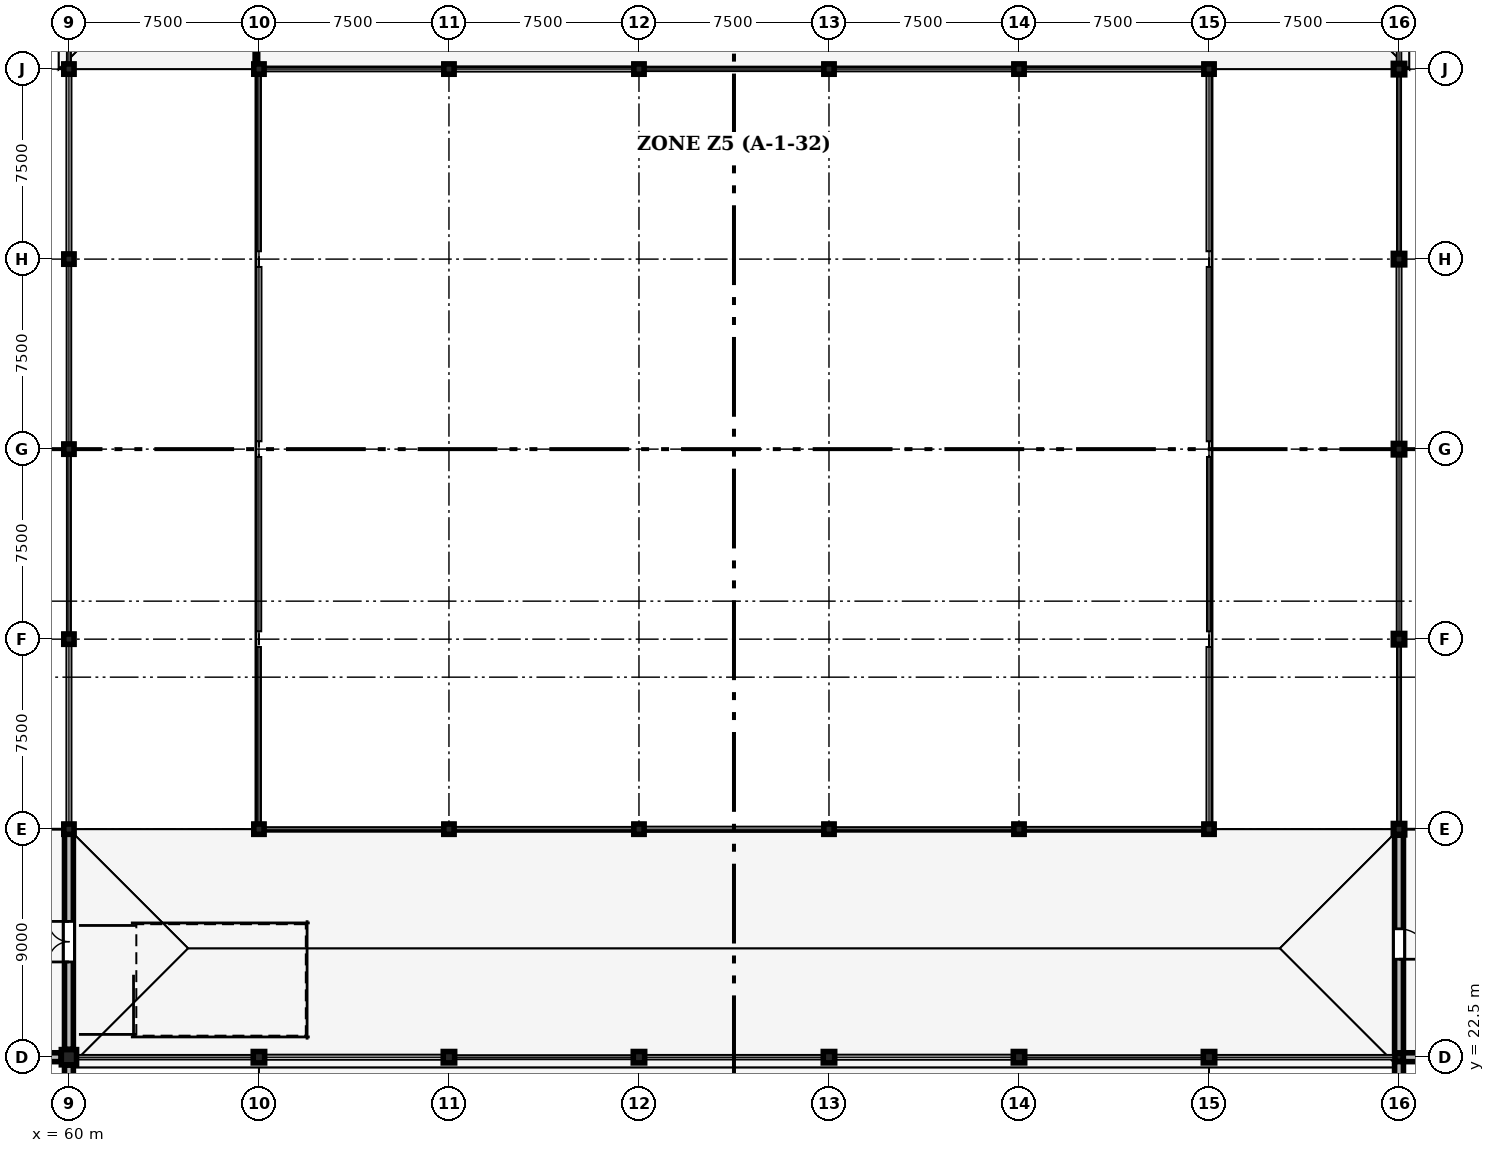
"""IFC4 building model, lengths in metres.
Left out: names, types, materials, properties, quantities, classifications, styles, units other than length and angle.
Written with IfcOpenShell. Run it as: python <this file> out.ifc"""

import sys

from ifc_helpers import new_model, si_unit, direction, frame, frame_2d, origin, origin_2d, place, context, subcontext, project, spatial, rectangle, hollow_circle, i_section, extrude, element, fill, save


model = new_model("IFC4")
c1 = context("Model", 3, precision=1e-05, world=origin(), true_north=direction((0.0, 1.0)))
c2 = subcontext(c1, "Body", "Model", "MODEL_VIEW")
j1 = project(units=[si_unit("LENGTHUNIT", "METRE"), si_unit("PLANEANGLEUNIT", "RADIAN")], contexts=[c1])
p1 = place(None, origin())
s1 = spatial("IfcSite", under=j1, at=p1, CompositionType="ELEMENT")
p2 = place(p1, origin())
s2 = spatial("IfcBuilding", under=s1, at=p2, CompositionType="ELEMENT")
p3 = place(p2, frame((0.0, 0.0, 9.3)))
s3 = spatial("IfcBuildingStorey", under=s2, at=p3, CompositionType="ELEMENT", Elevation=9.3)
p4 = place(p3, frame((60.0, 22.5, 0.0), z_axis=(0.0, 0.0, 1.0), x_axis=(1.0, 0.0, 0.0)))
e1 = element("IfcColumn", 1, at=p4, inside=s3, PredefinedType="COLUMN", context=c2, shape_type="SweptSolid", body=[
    extrude(rectangle(XDim=0.6, YDim=0.6, at=origin_2d()), origin(), (0.0, 0.0, 1.0), 4.8),
])
for number, where, z_axis, x_axis in (
    (2, (60.0, 31.5, 0.0), (0.0, 0.0, 1.0), (1.0, 0.0, 0.0)),
    (3, (60.0, 39.0, 0.0), (0.0, 0.0, 1.0), (1.0, 0.0, 0.0)),
    (4, (60.0, 46.5, 0.0), (0.0, 0.0, 1.0), (1.0, 0.0, 0.0)),
    (5, (60.0, 54.0, 0.0), (0.0, 0.0, 1.0), (1.0, 0.0, 0.0)),
    (6, (60.0, 61.5, 0.0), (0.0, 0.0, 1.0), (1.0, 0.0, 0.0)),
):
    element("IfcColumn", number, at=place(p3, frame(where, z_axis=z_axis, x_axis=x_axis)), inside=s3, PredefinedType="COLUMN", context=c2, shape_type="SweptSolid", body=[
        extrude(i_section(OverallWidth=0.3, OverallDepth=0.36, WebThickness=0.012, FlangeThickness=0.022, FilletRadius=0.027, at=origin_2d()), origin(), (0.0, 0.0, 1.0), 4.8),
    ])
p5 = place(p3, frame((67.5, 22.5, 0.0), z_axis=(0.0, 0.0, 1.0), x_axis=(1.0, 0.0, 0.0)))
e7 = element("IfcColumn", 7, at=p5, inside=s3, PredefinedType="COLUMN", context=c2, shape_type="SweptSolid", body=[
    extrude(rectangle(XDim=0.45, YDim=0.45, at=origin_2d()), origin(), (0.0, 0.0, 1.0), 4.8),
])
for number, where, z_axis, x_axis in (
    (8, (67.5, 31.5, 0.0), (0.0, 0.0, 1.0), (1.0, 0.0, 0.0)),
    (9, (67.5, 61.5, 0.0), (0.0, 0.0, 1.0), (1.0, 0.0, 0.0)),
):
    element("IfcColumn", number, at=place(p3, frame(where, z_axis=z_axis, x_axis=x_axis)), inside=s3, PredefinedType="COLUMN", context=c2, shape_type="SweptSolid", body=[
        extrude(i_section(OverallWidth=0.3, OverallDepth=0.36, WebThickness=0.012, FlangeThickness=0.022, FilletRadius=0.027, at=origin_2d()), origin(), (0.0, 0.0, 1.0), 4.8),
    ])
p6 = place(p3, frame((75.0, 22.5, 0.0), z_axis=(0.0, 0.0, 1.0), x_axis=(1.0, 0.0, 0.0)))
e10 = element("IfcColumn", 10, at=p6, inside=s3, PredefinedType="COLUMN", context=c2, shape_type="SweptSolid", body=[
    extrude(rectangle(XDim=0.45, YDim=0.45, at=origin_2d()), origin(), (0.0, 0.0, 1.0), 4.8),
])
for number, where, z_axis, x_axis in (
    (11, (75.0, 31.5, 0.0), (0.0, 0.0, 1.0), (1.0, 0.0, 0.0)),
    (12, (75.0, 61.5, 0.0), (0.0, 0.0, 1.0), (1.0, 0.0, 0.0)),
):
    element("IfcColumn", number, at=place(p3, frame(where, z_axis=z_axis, x_axis=x_axis)), inside=s3, PredefinedType="COLUMN", context=c2, shape_type="SweptSolid", body=[
        extrude(i_section(OverallWidth=0.3, OverallDepth=0.36, WebThickness=0.012, FlangeThickness=0.022, FilletRadius=0.027, at=origin_2d()), origin(), (0.0, 0.0, 1.0), 4.8),
    ])
p7 = place(p3, frame((82.5, 22.5, 0.0), z_axis=(0.0, 0.0, 1.0), x_axis=(1.0, 0.0, 0.0)))
e13 = element("IfcColumn", 13, at=p7, inside=s3, PredefinedType="COLUMN", context=c2, shape_type="SweptSolid", body=[
    extrude(rectangle(XDim=0.45, YDim=0.45, at=origin_2d()), origin(), (0.0, 0.0, 1.0), 4.8),
])
for number, where, z_axis, x_axis in (
    (14, (82.5, 31.5, 0.0), (0.0, 0.0, 1.0), (1.0, 0.0, 0.0)),
    (15, (82.5, 61.5, 0.0), (0.0, 0.0, 1.0), (1.0, 0.0, 0.0)),
):
    element("IfcColumn", number, at=place(p3, frame(where, z_axis=z_axis, x_axis=x_axis)), inside=s3, PredefinedType="COLUMN", context=c2, shape_type="SweptSolid", body=[
        extrude(i_section(OverallWidth=0.3, OverallDepth=0.36, WebThickness=0.012, FlangeThickness=0.022, FilletRadius=0.027, at=origin_2d()), origin(), (0.0, 0.0, 1.0), 4.8),
    ])
p8 = place(p3, frame((90.0, 22.5, 0.0), z_axis=(0.0, 0.0, 1.0), x_axis=(1.0, 0.0, 0.0)))
e16 = element("IfcColumn", 16, at=p8, inside=s3, PredefinedType="COLUMN", context=c2, shape_type="SweptSolid", body=[
    extrude(rectangle(XDim=0.45, YDim=0.45, at=origin_2d()), origin(), (0.0, 0.0, 1.0), 4.8),
])
for number, where, z_axis, x_axis in (
    (17, (90.0, 31.5, 0.0), (0.0, 0.0, 1.0), (1.0, 0.0, 0.0)),
    (18, (90.0, 61.5, 0.0), (0.0, 0.0, 1.0), (1.0, 0.0, 0.0)),
):
    element("IfcColumn", number, at=place(p3, frame(where, z_axis=z_axis, x_axis=x_axis)), inside=s3, PredefinedType="COLUMN", context=c2, shape_type="SweptSolid", body=[
        extrude(i_section(OverallWidth=0.3, OverallDepth=0.36, WebThickness=0.012, FlangeThickness=0.022, FilletRadius=0.027, at=origin_2d()), origin(), (0.0, 0.0, 1.0), 4.8),
    ])
p9 = place(p3, frame((97.5, 22.5, 0.0), z_axis=(0.0, 0.0, 1.0), x_axis=(1.0, 0.0, 0.0)))
e19 = element("IfcColumn", 19, at=p9, inside=s3, PredefinedType="COLUMN", context=c2, shape_type="SweptSolid", body=[
    extrude(rectangle(XDim=0.45, YDim=0.45, at=origin_2d()), origin(), (0.0, 0.0, 1.0), 4.8),
])
for number, where, z_axis, x_axis in (
    (20, (97.5, 31.5, 0.0), (0.0, 0.0, 1.0), (1.0, 0.0, 0.0)),
    (21, (97.5, 61.5, 0.0), (0.0, 0.0, 1.0), (1.0, 0.0, 0.0)),
):
    element("IfcColumn", number, at=place(p3, frame(where, z_axis=z_axis, x_axis=x_axis)), inside=s3, PredefinedType="COLUMN", context=c2, shape_type="SweptSolid", body=[
        extrude(i_section(OverallWidth=0.3, OverallDepth=0.36, WebThickness=0.012, FlangeThickness=0.022, FilletRadius=0.027, at=origin_2d()), origin(), (0.0, 0.0, 1.0), 4.8),
    ])
p10 = place(p3, frame((105.0, 22.5, 0.0), z_axis=(0.0, 0.0, 1.0), x_axis=(1.0, 0.0, 0.0)))
e22 = element("IfcColumn", 22, at=p10, inside=s3, PredefinedType="COLUMN", context=c2, shape_type="SweptSolid", body=[
    extrude(rectangle(XDim=0.45, YDim=0.45, at=origin_2d()), origin(), (0.0, 0.0, 1.0), 4.8),
])
for number, where, z_axis, x_axis in (
    (23, (105.0, 31.5, 0.0), (0.0, 0.0, 1.0), (1.0, 0.0, 0.0)),
    (24, (105.0, 61.5, 0.0), (0.0, 0.0, 1.0), (1.0, 0.0, 0.0)),
):
    element("IfcColumn", number, at=place(p3, frame(where, z_axis=z_axis, x_axis=x_axis)), inside=s3, PredefinedType="COLUMN", context=c2, shape_type="SweptSolid", body=[
        extrude(i_section(OverallWidth=0.3, OverallDepth=0.36, WebThickness=0.012, FlangeThickness=0.022, FilletRadius=0.027, at=origin_2d()), origin(), (0.0, 0.0, 1.0), 4.8),
    ])
p11 = place(p3, frame((112.5, 22.5, 0.0), z_axis=(0.0, 0.0, 1.0), x_axis=(1.0, 0.0, 0.0)))
e25 = element("IfcColumn", 25, at=p11, inside=s3, PredefinedType="COLUMN", context=c2, shape_type="SweptSolid", body=[
    extrude(rectangle(XDim=0.32, YDim=0.32, at=origin_2d()), origin(), (0.0, 0.0, 1.0), 4.8),
])
for number, where, z_axis, x_axis in (
    (26, (112.5, 31.5, 0.0), (0.0, 0.0, 1.0), (1.0, 0.0, 0.0)),
    (27, (112.5, 39.0, 0.0), (0.0, 0.0, 1.0), (1.0, 0.0, 0.0)),
    (28, (112.5, 46.5, 0.0), (0.0, 0.0, 1.0), (1.0, 0.0, 0.0)),
    (29, (112.5, 54.0, 0.0), (0.0, 0.0, 1.0), (1.0, 0.0, 0.0)),
    (30, (112.5, 61.5, 0.0), (0.0, 0.0, 1.0), (1.0, 0.0, 0.0)),
):
    element("IfcColumn", number, at=place(p3, frame(where, z_axis=z_axis, x_axis=x_axis)), inside=s3, PredefinedType="COLUMN", context=c2, shape_type="SweptSolid", body=[
        extrude(rectangle(XDim=0.45, YDim=0.45, at=origin_2d()), origin(), (0.0, 0.0, 1.0), 4.8),
    ])
p12 = place(p3, frame((60.0, 31.5, 4.8), z_axis=(0.0, 0.0, 1.0), x_axis=(1.0, 0.0, 0.0)))
e31 = element("IfcColumn", 31, at=p12, inside=s3, PredefinedType="COLUMN", context=c2, shape_type="SweptSolid", body=[
    extrude(hollow_circle(Radius=0.203, WallThickness=0.016, at=origin_2d()), origin(), (0.0, 0.0, 1.0), 2.75),
])
p13 = place(p3, frame((60.0, 39.0, 4.8), z_axis=(0.0, 0.0, 1.0), x_axis=(1.0, 0.0, 0.0)))
e32 = element("IfcColumn", 32, at=p13, inside=s3, PredefinedType="COLUMN", context=c2, shape_type="SweptSolid", body=[
    extrude(hollow_circle(Radius=0.203, WallThickness=0.016, at=origin_2d()), origin(), (0.0, 0.0, 1.0), 4.4),
])
p14 = place(p3, frame((60.0, 46.5, 4.8), z_axis=(0.0, 0.0, 1.0), x_axis=(1.0, 0.0, 0.0)))
e33 = element("IfcColumn", 33, at=p14, inside=s3, PredefinedType="COLUMN", context=c2, shape_type="SweptSolid", body=[
    extrude(hollow_circle(Radius=0.203, WallThickness=0.016, at=origin_2d()), origin(), (0.0, 0.0, 1.0), 4.95),
])
p15 = place(p3, frame((60.0, 54.0, 4.8), z_axis=(0.0, 0.0, 1.0), x_axis=(1.0, 0.0, 0.0)))
e34 = element("IfcColumn", 34, at=p15, inside=s3, PredefinedType="COLUMN", context=c2, shape_type="SweptSolid", body=[
    extrude(hollow_circle(Radius=0.203, WallThickness=0.016, at=origin_2d()), origin(), (0.0, 0.0, 1.0), 4.4),
])
p16 = place(p3, frame((60.0, 61.5, 4.8), z_axis=(0.0, 0.0, 1.0), x_axis=(1.0, 0.0, 0.0)))
e35 = element("IfcColumn", 35, at=p16, inside=s3, PredefinedType="COLUMN", context=c2, shape_type="SweptSolid", body=[
    extrude(hollow_circle(Radius=0.203, WallThickness=0.016, at=origin_2d()), origin(), (0.0, 0.0, 1.0), 2.75),
])
for number, where, z_axis, x_axis in (
    (36, (67.5, 31.5, 4.8), (0.0, 0.0, 1.0), (1.0, 0.0, 0.0)),
    (37, (67.5, 61.5, 4.8), (0.0, 0.0, 1.0), (1.0, 0.0, 0.0)),
):
    element("IfcColumn", number, at=place(p3, frame(where, z_axis=z_axis, x_axis=x_axis)), inside=s3, PredefinedType="COLUMN", context=c2, shape_type="SweptSolid", body=[
        extrude(hollow_circle(Radius=0.203, WallThickness=0.016, at=origin_2d()), origin(), (0.0, 0.0, 1.0), 4.415),
    ])
for number, where, z_axis, x_axis in (
    (38, (75.0, 31.5, 4.8), (0.0, 0.0, 1.0), (1.0, 0.0, 0.0)),
    (39, (75.0, 61.5, 4.8), (0.0, 0.0, 1.0), (1.0, 0.0, 0.0)),
):
    element("IfcColumn", number, at=place(p3, frame(where, z_axis=z_axis, x_axis=x_axis)), inside=s3, PredefinedType="COLUMN", context=c2, shape_type="SweptSolid", body=[
        extrude(hollow_circle(Radius=0.203, WallThickness=0.016, at=origin_2d()), origin(), (0.0, 0.0, 1.0), 5.525),
    ])
for number, where, z_axis, x_axis in (
    (40, (82.5, 31.5, 4.8), (0.0, 0.0, 1.0), (1.0, 0.0, 0.0)),
    (41, (82.5, 61.5, 4.8), (0.0, 0.0, 1.0), (1.0, 0.0, 0.0)),
    (42, (90.0, 31.5, 4.8), (0.0, 0.0, 1.0), (1.0, 0.0, 0.0)),
    (43, (90.0, 61.5, 4.8), (0.0, 0.0, 1.0), (1.0, 0.0, 0.0)),
):
    element("IfcColumn", number, at=place(p3, frame(where, z_axis=z_axis, x_axis=x_axis)), inside=s3, PredefinedType="COLUMN", context=c2, shape_type="SweptSolid", body=[
        extrude(hollow_circle(Radius=0.203, WallThickness=0.016, at=origin_2d()), origin(), (0.0, 0.0, 1.0), 6.081),
    ])
for number, where, z_axis, x_axis in (
    (44, (97.5, 31.5, 4.8), (0.0, 0.0, 1.0), (1.0, 0.0, 0.0)),
    (45, (97.5, 61.5, 4.8), (0.0, 0.0, 1.0), (1.0, 0.0, 0.0)),
):
    element("IfcColumn", number, at=place(p3, frame(where, z_axis=z_axis, x_axis=x_axis)), inside=s3, PredefinedType="COLUMN", context=c2, shape_type="SweptSolid", body=[
        extrude(hollow_circle(Radius=0.203, WallThickness=0.016, at=origin_2d()), origin(), (0.0, 0.0, 1.0), 5.525),
    ])
for number, where, z_axis, x_axis in (
    (46, (105.0, 31.5, 4.8), (0.0, 0.0, 1.0), (1.0, 0.0, 0.0)),
    (47, (105.0, 61.5, 4.8), (0.0, 0.0, 1.0), (1.0, 0.0, 0.0)),
):
    element("IfcColumn", number, at=place(p3, frame(where, z_axis=z_axis, x_axis=x_axis)), inside=s3, PredefinedType="COLUMN", context=c2, shape_type="SweptSolid", body=[
        extrude(hollow_circle(Radius=0.203, WallThickness=0.016, at=origin_2d()), origin(), (0.0, 0.0, 1.0), 4.415),
    ])
p17 = place(p3, frame((112.5, 31.5, 4.8), z_axis=(0.0, 0.0, 1.0), x_axis=(1.0, 0.0, 0.0)))
e48 = element("IfcColumn", 48, at=p17, inside=s3, PredefinedType="COLUMN", context=c2, shape_type="SweptSolid", body=[
    extrude(hollow_circle(Radius=0.203, WallThickness=0.016, at=origin_2d()), origin(), (0.0, 0.0, 1.0), 2.75),
])
p18 = place(p3, frame((112.5, 39.0, 4.8), z_axis=(0.0, 0.0, 1.0), x_axis=(1.0, 0.0, 0.0)))
e49 = element("IfcColumn", 49, at=p18, inside=s3, PredefinedType="COLUMN", context=c2, shape_type="SweptSolid", body=[
    extrude(hollow_circle(Radius=0.203, WallThickness=0.016, at=origin_2d()), origin(), (0.0, 0.0, 1.0), 4.4),
])
p19 = place(p3, frame((112.5, 46.5, 4.8), z_axis=(0.0, 0.0, 1.0), x_axis=(1.0, 0.0, 0.0)))
e50 = element("IfcColumn", 50, at=p19, inside=s3, PredefinedType="COLUMN", context=c2, shape_type="SweptSolid", body=[
    extrude(hollow_circle(Radius=0.203, WallThickness=0.016, at=origin_2d()), origin(), (0.0, 0.0, 1.0), 4.95),
])
p20 = place(p3, frame((112.5, 54.0, 4.8), z_axis=(0.0, 0.0, 1.0), x_axis=(1.0, 0.0, 0.0)))
e51 = element("IfcColumn", 51, at=p20, inside=s3, PredefinedType="COLUMN", context=c2, shape_type="SweptSolid", body=[
    extrude(hollow_circle(Radius=0.203, WallThickness=0.016, at=origin_2d()), origin(), (0.0, 0.0, 1.0), 4.4),
])
p21 = place(p3, frame((112.5, 61.5, 4.8), z_axis=(0.0, 0.0, 1.0), x_axis=(1.0, 0.0, 0.0)))
e52 = element("IfcColumn", 52, at=p21, inside=s3, PredefinedType="COLUMN", context=c2, shape_type="SweptSolid", body=[
    extrude(hollow_circle(Radius=0.203, WallThickness=0.016, at=origin_2d()), origin(), (0.0, 0.0, 1.0), 2.75),
])
p22 = place(p3, frame((52.67, 22.5, 0.0), z_axis=(0.0, 0.0, 1.0), x_axis=(1.0, 0.0, 0.0)))
e53 = element("IfcWall", 53, at=p22, inside=s3, PredefinedType="STANDARD", context=c2, shape_type="SweptSolid", body=[
    extrude(rectangle(XDim=7.02, YDim=0.35, at=frame_2d((3.51, 0.0))), origin(), (0.0, 0.0, 1.0), 3.95),
])
p23 = place(p22, frame((2.91, 0.0, 0.0)))
e54 = element("IfcOpeningElement", 54, at=p23, cuts=e53, PredefinedType="OPENING", context=c2, shape_type="SweptSolid", body=[
    extrude(rectangle(XDim=1.2, YDim=2.3, at=frame_2d((0.6, 1.15))), frame((0.0, 0.185, 0.0), z_axis=(0.0, -1.0, 0.0), x_axis=(1.0, 0.0, 0.0)), (0.0, 0.0, 1.0), 0.37),
])
p24 = place(p3, frame((60.0, 22.19, 0.0), z_axis=(0.0, 0.0, 1.0), x_axis=(0.0, -1.0, 0.0)))
e55 = element("IfcWall", 55, at=p24, inside=s3, PredefinedType="STANDARD", context=c2, shape_type="SweptSolid", body=[
    extrude(rectangle(XDim=6.88, YDim=0.35, at=frame_2d((3.44, 0.0))), origin(), (0.0, 0.0, 1.0), 3.95),
])
p25 = place(p24, frame((2.54, 0.0, 0.9)))
e56 = element("IfcOpeningElement", 56, at=p25, cuts=e55, PredefinedType="OPENING", context=c2, shape_type="SweptSolid", body=[
    extrude(rectangle(XDim=1.8, YDim=2.4, at=frame_2d((0.9, 1.2))), frame((0.0, 0.185, 0.0), z_axis=(0.0, -1.0, 0.0), x_axis=(1.0, 0.0, 0.0)), (0.0, 0.0, 1.0), 0.37),
])
p26 = place(p3, frame((60.0, 22.81, 0.0), z_axis=(0.0, 0.0, 1.0), x_axis=(0.0, 1.0, 0.0)))
e57 = element("IfcWall", 57, at=p26, inside=s3, PredefinedType="STANDARD", context=c2, shape_type="SweptSolid", body=[
    extrude(rectangle(XDim=8.5, YDim=0.35, at=frame_2d((4.25, 0.0))), origin(), (0.0, 0.0, 1.0), 4.55),
])
p27 = place(p26, frame((3.45, 0.0, 0.0)))
e58 = element("IfcOpeningElement", 58, at=p27, cuts=e57, PredefinedType="OPENING", context=c2, shape_type="SweptSolid", body=[
    extrude(rectangle(XDim=1.6, YDim=2.35, at=frame_2d((0.8, 1.175))), frame((0.0, 0.185, 0.0), z_axis=(0.0, -1.0, 0.0), x_axis=(1.0, 0.0, 0.0)), (0.0, 0.0, 1.0), 0.37),
])
p28 = place(p3, frame((112.5, 31.265, 0.0), z_axis=(0.0, 0.0, 1.0), x_axis=(0.0, -1.0, 0.0)))
e59 = element("IfcWall", 59, at=p28, inside=s3, PredefinedType="STANDARD", context=c2, shape_type="SweptSolid", body=[
    extrude(rectangle(XDim=8.595, YDim=0.35, at=frame_2d((4.297, 0.0))), origin(), (0.0, 0.0, 1.0), 4.55),
])
p29 = place(p28, frame((3.698, 0.0, 0.0)))
e60 = element("IfcOpeningElement", 60, at=p29, cuts=e59, PredefinedType="OPENING", context=c2, shape_type="SweptSolid", body=[
    extrude(rectangle(XDim=1.2, YDim=2.3, at=frame_2d((0.6, 1.15))), frame((0.0, 0.185, 0.0), z_axis=(0.0, -1.0, 0.0), x_axis=(1.0, 0.0, 0.0)), (0.0, 0.0, 1.0), 0.37),
])
p30 = place(p3, frame((112.67, 22.5, 0.0), z_axis=(0.0, 0.0, 1.0), x_axis=(1.0, 0.0, 0.0)))
e61 = element("IfcWall", 61, at=p30, inside=s3, PredefinedType="STANDARD", context=c2, shape_type="SweptSolid", body=[
    extrude(rectangle(XDim=7.16, YDim=0.35, at=frame_2d((3.58, 0.0))), origin(), (0.0, 0.0, 1.0), 3.95),
])
p31 = place(p30, frame((2.98, 0.0, 0.0)))
e62 = element("IfcOpeningElement", 62, at=p31, cuts=e61, PredefinedType="OPENING", context=c2, shape_type="SweptSolid", body=[
    extrude(rectangle(XDim=1.2, YDim=2.3, at=frame_2d((0.6, 1.15))), frame((0.0, 0.185, 0.0), z_axis=(0.0, -1.0, 0.0), x_axis=(1.0, 0.0, 0.0)), (0.0, 0.0, 1.0), 0.37),
])
p32 = place(p3, frame((112.5, 15.31, 0.0), z_axis=(0.0, 0.0, 1.0), x_axis=(0.0, 1.0, 0.0)))
e63 = element("IfcWall", 63, at=p32, inside=s3, PredefinedType="STANDARD", context=c2, shape_type="SweptSolid", body=[
    extrude(rectangle(XDim=7.02, YDim=0.35, at=frame_2d((3.51, 0.0))), origin(), (0.0, 0.0, 1.0), 3.95),
])
p33 = place(p32, frame((2.46, 0.0, 0.9)))
e64 = element("IfcOpeningElement", 64, at=p33, cuts=e63, PredefinedType="OPENING", context=c2, shape_type="SweptSolid", body=[
    extrude(rectangle(XDim=2.1, YDim=2.1, at=frame_2d((1.05, 1.05))), frame((0.0, 0.185, 0.0), z_axis=(0.0, -1.0, 0.0), x_axis=(1.0, 0.0, 0.0)), (0.0, 0.0, 1.0), 0.37),
])
p34 = place(p3, frame((67.4, 76.15, 0.0), z_axis=(0.0, 0.0, 1.0), x_axis=(0.0, -1.0, 0.0)))
e65 = element("IfcWall", 65, at=p34, inside=s3, PredefinedType="PARTITIONING", context=c2, shape_type="SweptSolid", body=[
    extrude(rectangle(XDim=14.65, YDim=0.1, at=frame_2d((7.325, 0.0))), origin(), (0.0, 0.0, 1.0), 4.535),
])
p35 = place(p34, frame((2.87, 0.0, 0.0)))
e66 = element("IfcOpeningElement", 66, at=p35, cuts=e65, PredefinedType="OPENING", context=c2, shape_type="SweptSolid", body=[
    extrude(rectangle(XDim=1.05, YDim=2.2, at=frame_2d((0.525, 1.1))), frame((0.0, 0.06, 0.0), z_axis=(0.0, -1.0, 0.0), x_axis=(1.0, 0.0, 0.0)), (0.0, 0.0, 1.0), 0.12),
])
p36 = place(p27, origin())
e67 = element("IfcDoor", 67, at=p36, inside=s3, OperationType="DOUBLE_DOOR_SINGLE_SWING", PredefinedType="DOOR", context=c2, shape_type="SweptSolid", body=[
    extrude(rectangle(XDim=1.6, YDim=2.35, at=frame_2d((0.8, 1.175))), frame((0.0, 0.025, 0.0), z_axis=(0.0, -1.0, 0.0), x_axis=(1.0, 0.0, 0.0)), (0.0, 0.0, 1.0), 0.05),
])
fill(e58, e67)
p37 = place(p29, origin())
e68 = element("IfcDoor", 68, at=p37, inside=s3, OperationType="SINGLE_SWING_RIGHT", PredefinedType="DOOR", context=c2, shape_type="SweptSolid", body=[
    extrude(rectangle(XDim=1.2, YDim=2.3, at=frame_2d((0.6, 1.15))), frame((0.0, 0.025, 0.0), z_axis=(0.0, -1.0, 0.0), x_axis=(1.0, 0.0, 0.0)), (0.0, 0.0, 1.0), 0.05),
])
fill(e60, e68)
save(model, sys.argv[1])
